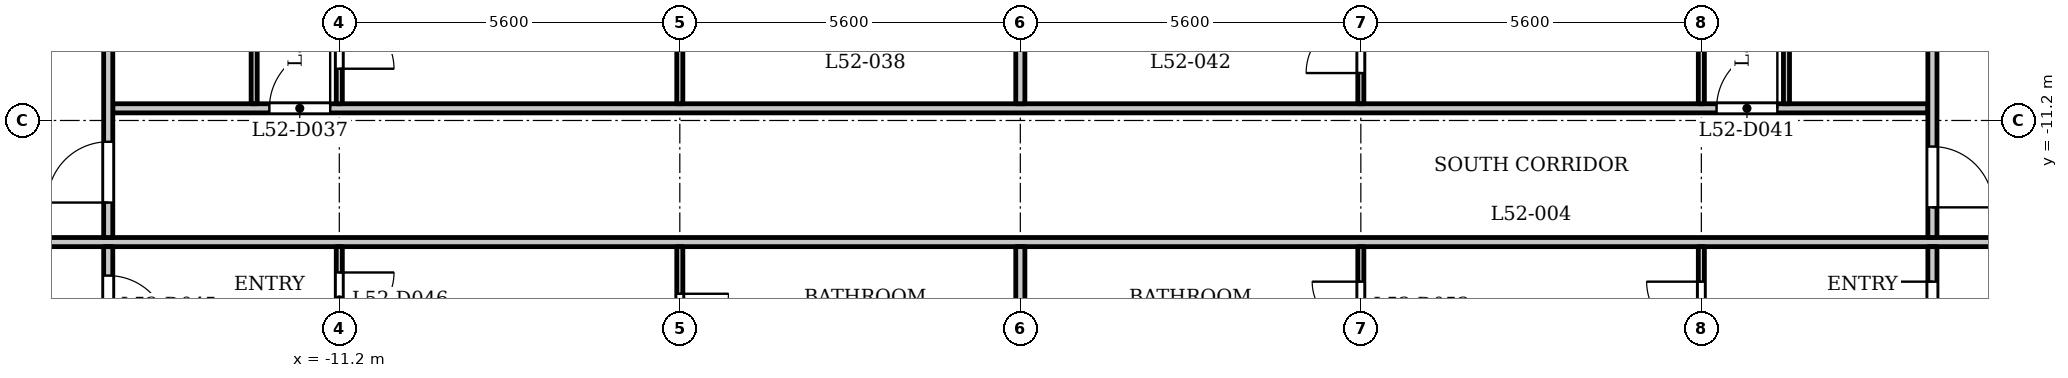
"""IFC4 building model, lengths in metres.
Left out: names, types, materials, properties, quantities, classifications, styles, units other than length and angle.
Written with IfcOpenShell. Run it as: python <this file> out.ifc"""

import sys

from ifc_helpers import new_model, si_unit, direction, frame, frame_2d, origin, place, context, subcontext, project, spatial, rectangle, extrude, element, fill, save


model = new_model("IFC4")
c1 = context("Model", 3, precision=1e-05, world=origin(), true_north=direction((0.0, 1.0)))
c2 = subcontext(c1, "Body", "Model", "MODEL_VIEW")
j1 = project(units=[si_unit("LENGTHUNIT", "METRE"), si_unit("PLANEANGLEUNIT", "RADIAN")], contexts=[c1])
p1 = place(None, origin())
s1 = spatial("IfcSite", under=j1, at=p1, CompositionType="ELEMENT")
p2 = place(p1, origin())
s2 = spatial("IfcBuilding", under=s1, at=p2, CompositionType="ELEMENT")
p3 = place(p2, frame((0.0, 0.0, 202.9)))
s3 = spatial("IfcBuildingStorey", under=s2, at=p3, CompositionType="ELEMENT", Elevation=202.9)
p4 = place(p3, frame((-17.4, -13.2, 0.0), z_axis=(0.0, 0.0, 1.0), x_axis=(1.0, 0.0, 0.0)))
e1 = element("IfcWall", 1, at=p4, inside=s3, PredefinedType="PARTITIONING", context=c2, shape_type="SweptSolid", body=[
    extrude(rectangle(XDim=34.8, YDim=0.15, at=frame_2d((17.4, 0.0))), origin(), (0.0, 0.0, 1.0), 3.2),
])
p5 = place(p4, frame((0.15, 0.0, 0.0)))
e2 = element("IfcOpeningElement", 2, at=p5, cuts=e1, PredefinedType="OPENING", context=c2, shape_type="SweptSolid", body=[
    extrude(rectangle(XDim=1.0, YDim=2.1, at=frame_2d((0.5, 1.05))), frame((0.0, 0.085, 0.0), z_axis=(0.0, -1.0, 0.0), x_axis=(1.0, 0.0, 0.0)), (0.0, 0.0, 1.0), 0.17),
])
p6 = place(p4, frame((33.55, 0.0, 0.0)))
e3 = element("IfcOpeningElement", 3, at=p6, cuts=e1, PredefinedType="OPENING", context=c2, shape_type="SweptSolid", body=[
    extrude(rectangle(XDim=1.0, YDim=2.1, at=frame_2d((0.5, 1.05))), frame((0.0, 0.085, 0.0), z_axis=(0.0, -1.0, 0.0), x_axis=(1.0, 0.0, 0.0)), (0.0, 0.0, 1.0), 0.17),
])
p7 = place(p3, frame((-14.925, -11.0, 0.0), z_axis=(0.0, 0.0, 1.0), x_axis=(1.0, 0.0, 0.0)))
e4 = element("IfcWall", 4, at=p7, inside=s3, PredefinedType="PARTITIONING", context=c2, shape_type="SweptSolid", body=[
    extrude(rectangle(XDim=29.85, YDim=0.15, at=frame_2d((14.925, 0.0))), origin(), (0.0, 0.0, 1.0), 3.2),
])
p8 = place(p7, frame((2.575, 0.0, 0.0)))
e5 = element("IfcOpeningElement", 5, at=p8, cuts=e4, PredefinedType="OPENING", context=c2, shape_type="SweptSolid", body=[
    extrude(rectangle(XDim=1.0, YDim=2.1, at=frame_2d((0.5, 1.05))), frame((0.0, 0.085, 0.0), z_axis=(0.0, -1.0, 0.0), x_axis=(1.0, 0.0, 0.0)), (0.0, 0.0, 1.0), 0.17),
])
p9 = place(p7, frame((26.375, 0.0, 0.0)))
e6 = element("IfcOpeningElement", 6, at=p9, cuts=e4, PredefinedType="OPENING", context=c2, shape_type="SweptSolid", body=[
    extrude(rectangle(XDim=1.0, YDim=2.1, at=frame_2d((0.5, 1.05))), frame((0.0, 0.085, 0.0), z_axis=(0.0, -1.0, 0.0), x_axis=(1.0, 0.0, 0.0)), (0.0, 0.0, 1.0), 0.17),
])
p10 = place(p3, frame((-15.0, -15.325, 0.0), z_axis=(0.0, 0.0, 1.0), x_axis=(0.0, 1.0, 0.0)))
e7 = element("IfcWall", 7, at=p10, inside=s3, PredefinedType="PARTITIONING", context=c2, shape_type="SweptSolid", body=[
    extrude(rectangle(XDim=2.05, YDim=0.15, at=frame_2d((1.025, 0.0))), origin(), (0.0, 0.0, 1.0), 3.2),
])
p11 = place(p10, frame((0.574, 0.0, 0.0)))
e8 = element("IfcOpeningElement", 8, at=p11, cuts=e7, PredefinedType="OPENING", context=c2, shape_type="SweptSolid", body=[
    extrude(rectangle(XDim=1.0, YDim=2.1, at=frame_2d((0.5, 1.05))), frame((0.0, 0.085, 0.0), z_axis=(0.0, -1.0, 0.0), x_axis=(1.0, 0.0, 0.0)), (0.0, 0.0, 1.0), 0.17),
])
p12 = place(p3, frame((-15.0, -13.125, 0.0), z_axis=(0.0, 0.0, 1.0), x_axis=(0.0, 1.0, 0.0)))
e9 = element("IfcWall", 9, at=p12, inside=s3, PredefinedType="PARTITIONING", context=c2, shape_type="SweptSolid", body=[
    extrude(rectangle(XDim=6.356, YDim=0.15, at=frame_2d((3.178, 0.0))), origin(), (0.0, 0.0, 1.0), 3.2),
])
p13 = place(p12, frame((0.575, 0.0, 0.0)))
e10 = element("IfcOpeningElement", 10, at=p13, cuts=e9, PredefinedType="OPENING", context=c2, shape_type="SweptSolid", body=[
    extrude(rectangle(XDim=1.0, YDim=2.1, at=frame_2d((0.5, 1.05))), frame((0.0, 0.085, 0.0), z_axis=(0.0, -1.0, 0.0), x_axis=(1.0, 0.0, 0.0)), (0.0, 0.0, 1.0), 0.17),
])
p14 = place(p3, frame((-12.6, -10.925, 0.0), z_axis=(0.0, 0.0, 1.0), x_axis=(0.0, 1.0, 0.0)))
e11 = element("IfcWall", 11, at=p14, inside=s3, PredefinedType="PARTITIONING", context=c2, shape_type="SweptSolid", body=[
    extrude(rectangle(XDim=3.605, YDim=0.1, at=frame_2d((1.802, 0.0))), origin(), (0.0, 0.0, 1.0), 3.2),
])
p15 = place(p14, frame((1.105, 0.0, 0.0)))
e12 = element("IfcOpeningElement", 12, at=p15, cuts=e11, PredefinedType="OPENING", context=c2, shape_type="SweptSolid", body=[
    extrude(rectangle(XDim=0.8, YDim=2.1, at=frame_2d((0.4, 1.05))), frame((0.0, 0.06, 0.0), z_axis=(0.0, -1.0, 0.0), x_axis=(1.0, 0.0, 0.0)), (0.0, 0.0, 1.0), 0.12),
])
p16 = place(p3, frame((-11.2, -16.45, 0.0), z_axis=(0.0, 0.0, 1.0), x_axis=(0.0, 1.0, 0.0)))
e13 = element("IfcWall", 13, at=p16, inside=s3, PredefinedType="PARTITIONING", context=c2, shape_type="SweptSolid", body=[
    extrude(rectangle(XDim=3.175, YDim=0.1, at=frame_2d((1.587, 0.0))), origin(), (0.0, 0.0, 1.0), 3.2),
])
p17 = place(p16, frame((1.85, 0.0, 0.0)))
e14 = element("IfcOpeningElement", 14, at=p17, cuts=e13, PredefinedType="OPENING", context=c2, shape_type="SweptSolid", body=[
    extrude(rectangle(XDim=0.9, YDim=2.1, at=frame_2d((0.45, 1.05))), frame((0.0, 0.06, 0.0), z_axis=(0.0, -1.0, 0.0), x_axis=(1.0, 0.0, 0.0)), (0.0, 0.0, 1.0), 0.12),
])
p18 = place(p3, frame((-11.2, -10.925, 0.0), z_axis=(0.0, 0.0, 1.0), x_axis=(0.0, 1.0, 0.0)))
e15 = element("IfcWall", 15, at=p18, inside=s3, PredefinedType="PARTITIONING", context=c2, shape_type="SweptSolid", body=[
    extrude(rectangle(XDim=3.605, YDim=0.1, at=frame_2d((1.802, 0.0))), origin(), (0.0, 0.0, 1.0), 3.2),
])
p19 = place(p18, frame((0.576, 0.0, 0.0)))
e16 = element("IfcOpeningElement", 16, at=p19, cuts=e15, PredefinedType="OPENING", context=c2, shape_type="SweptSolid", body=[
    extrude(rectangle(XDim=0.9, YDim=2.1, at=frame_2d((0.45, 1.05))), frame((0.0, 0.06, 0.0), z_axis=(0.0, -1.0, 0.0), x_axis=(1.0, 0.0, 0.0)), (0.0, 0.0, 1.0), 0.12),
])
p20 = place(p3, frame((-5.6, -16.45, 0.0), z_axis=(0.0, 0.0, 1.0), x_axis=(0.0, 1.0, 0.0)))
e17 = element("IfcWall", 17, at=p20, inside=s3, PredefinedType="PARTITIONING", context=c2, shape_type="SweptSolid", body=[
    extrude(rectangle(XDim=3.175, YDim=0.1, at=frame_2d((1.587, 0.0))), origin(), (0.0, 0.0, 1.0), 3.2),
])
p21 = place(p20, frame((1.6, 0.0, 0.0)))
e18 = element("IfcOpeningElement", 18, at=p21, cuts=e17, PredefinedType="OPENING", context=c2, shape_type="SweptSolid", body=[
    extrude(rectangle(XDim=0.8, YDim=2.1, at=frame_2d((0.4, 1.05))), frame((0.0, 0.06, 0.0), z_axis=(0.0, -1.0, 0.0), x_axis=(1.0, 0.0, 0.0)), (0.0, 0.0, 1.0), 0.12),
])
p22 = place(p3, frame((-5.6, -10.925, 0.0), z_axis=(0.0, 0.0, 1.0), x_axis=(0.0, 1.0, 0.0)))
e19 = element("IfcWall", 19, at=p22, inside=s3, PredefinedType="PARTITIONING", context=c2, shape_type="SweptSolid", body=[
    extrude(rectangle(XDim=3.605, YDim=0.1, at=frame_2d((1.802, 0.0))), origin(), (0.0, 0.0, 1.0), 3.2),
])
p23 = place(p22, frame((1.076, 0.0, 0.0)))
e20 = element("IfcOpeningElement", 20, at=p23, cuts=e19, PredefinedType="OPENING", context=c2, shape_type="SweptSolid", body=[
    extrude(rectangle(XDim=0.9, YDim=2.1, at=frame_2d((0.45, 1.05))), frame((0.0, 0.06, 0.0), z_axis=(0.0, -1.0, 0.0), x_axis=(1.0, 0.0, 0.0)), (0.0, 0.0, 1.0), 0.12),
])
p24 = place(p3, frame((0.0, -16.45, 0.0), z_axis=(0.0, 0.0, 1.0), x_axis=(0.0, 1.0, 0.0)))
e21 = element("IfcWall", 21, at=p24, inside=s3, PredefinedType="PARTITIONING", context=c2, shape_type="SweptSolid", body=[
    extrude(rectangle(XDim=3.175, YDim=0.15, at=frame_2d((1.587, 0.0))), origin(), (0.0, 0.0, 1.0), 3.2),
])
p25 = place(p3, frame((0.0, -10.925, 0.0), z_axis=(0.0, 0.0, 1.0), x_axis=(0.0, 1.0, 0.0)))
e22 = element("IfcWall", 22, at=p25, inside=s3, PredefinedType="PARTITIONING", context=c2, shape_type="SweptSolid", body=[
    extrude(rectangle(XDim=3.605, YDim=0.15, at=frame_2d((1.802, 0.0))), origin(), (0.0, 0.0, 1.0), 3.2),
])
p26 = place(p3, frame((5.6, -16.45, 0.0), z_axis=(0.0, 0.0, 1.0), x_axis=(0.0, 1.0, 0.0)))
e23 = element("IfcWall", 23, at=p26, inside=s3, PredefinedType="PARTITIONING", context=c2, shape_type="SweptSolid", body=[
    extrude(rectangle(XDim=3.175, YDim=0.1, at=frame_2d((1.587, 0.0))), origin(), (0.0, 0.0, 1.0), 3.2),
])
p27 = place(p26, frame((1.799, 0.0, 0.0)))
e24 = element("IfcOpeningElement", 24, at=p27, cuts=e23, PredefinedType="OPENING", context=c2, shape_type="SweptSolid", body=[
    extrude(rectangle(XDim=0.8, YDim=2.1, at=frame_2d((0.4, 1.05))), frame((0.0, 0.06, 0.0), z_axis=(0.0, -1.0, 0.0), x_axis=(1.0, 0.0, 0.0)), (0.0, 0.0, 1.0), 0.12),
])
p28 = place(p3, frame((5.6, -10.925, 0.0), z_axis=(0.0, 0.0, 1.0), x_axis=(0.0, 1.0, 0.0)))
e25 = element("IfcWall", 25, at=p28, inside=s3, PredefinedType="PARTITIONING", context=c2, shape_type="SweptSolid", body=[
    extrude(rectangle(XDim=3.605, YDim=0.1, at=frame_2d((1.802, 0.0))), origin(), (0.0, 0.0, 1.0), 3.2),
])
p29 = place(p28, frame((0.505, 0.0, 0.0)))
e26 = element("IfcOpeningElement", 26, at=p29, cuts=e25, PredefinedType="OPENING", context=c2, shape_type="SweptSolid", body=[
    extrude(rectangle(XDim=0.9, YDim=2.1, at=frame_2d((0.45, 1.05))), frame((0.0, 0.06, 0.0), z_axis=(0.0, -1.0, 0.0), x_axis=(1.0, 0.0, 0.0)), (0.0, 0.0, 1.0), 0.12),
])
p30 = place(p3, frame((11.2, -16.45, 0.0), z_axis=(0.0, 0.0, 1.0), x_axis=(0.0, 1.0, 0.0)))
e27 = element("IfcWall", 27, at=p30, inside=s3, PredefinedType="PARTITIONING", context=c2, shape_type="SweptSolid", body=[
    extrude(rectangle(XDim=3.175, YDim=0.1, at=frame_2d((1.587, 0.0))), origin(), (0.0, 0.0, 1.0), 3.2),
])
p31 = place(p30, frame((1.699, 0.0, 0.0)))
e28 = element("IfcOpeningElement", 28, at=p31, cuts=e27, PredefinedType="OPENING", context=c2, shape_type="SweptSolid", body=[
    extrude(rectangle(XDim=0.9, YDim=2.1, at=frame_2d((0.45, 1.05))), frame((0.0, 0.06, 0.0), z_axis=(0.0, -1.0, 0.0), x_axis=(1.0, 0.0, 0.0)), (0.0, 0.0, 1.0), 0.12),
])
p32 = place(p3, frame((11.2, -10.925, 0.0), z_axis=(0.0, 0.0, 1.0), x_axis=(0.0, 1.0, 0.0)))
e29 = element("IfcWall", 29, at=p32, inside=s3, PredefinedType="PARTITIONING", context=c2, shape_type="SweptSolid", body=[
    extrude(rectangle(XDim=3.605, YDim=0.1, at=frame_2d((1.802, 0.0))), origin(), (0.0, 0.0, 1.0), 3.2),
])
p33 = place(p32, frame((1.005, 0.0, 0.0)))
e30 = element("IfcOpeningElement", 30, at=p33, cuts=e29, PredefinedType="OPENING", context=c2, shape_type="SweptSolid", body=[
    extrude(rectangle(XDim=0.9, YDim=2.1, at=frame_2d((0.45, 1.05))), frame((0.0, 0.06, 0.0), z_axis=(0.0, -1.0, 0.0), x_axis=(1.0, 0.0, 0.0)), (0.0, 0.0, 1.0), 0.12),
])
p34 = place(p3, frame((12.6, -10.925, 0.0), z_axis=(0.0, 0.0, 1.0), x_axis=(0.0, 1.0, 0.0)))
e31 = element("IfcWall", 31, at=p34, inside=s3, PredefinedType="PARTITIONING", context=c2, shape_type="SweptSolid", body=[
    extrude(rectangle(XDim=3.605, YDim=0.1, at=frame_2d((1.802, 0.0))), origin(), (0.0, 0.0, 1.0), 3.2),
])
p35 = place(p34, frame((1.076, 0.0, 0.0)))
e32 = element("IfcOpeningElement", 32, at=p35, cuts=e31, PredefinedType="OPENING", context=c2, shape_type="SweptSolid", body=[
    extrude(rectangle(XDim=0.8, YDim=2.1, at=frame_2d((0.4, 1.05))), frame((0.0, 0.06, 0.0), z_axis=(0.0, -1.0, 0.0), x_axis=(1.0, 0.0, 0.0)), (0.0, 0.0, 1.0), 0.12),
])
p36 = place(p3, frame((15.0, -15.325, 0.0), z_axis=(0.0, 0.0, 1.0), x_axis=(0.0, 1.0, 0.0)))
e33 = element("IfcWall", 33, at=p36, inside=s3, PredefinedType="PARTITIONING", context=c2, shape_type="SweptSolid", body=[
    extrude(rectangle(XDim=2.05, YDim=0.15, at=frame_2d((1.025, 0.0))), origin(), (0.0, 0.0, 1.0), 3.2),
])
p37 = place(p36, frame((0.474, 0.0, 0.0)))
e34 = element("IfcOpeningElement", 34, at=p37, cuts=e33, PredefinedType="OPENING", context=c2, shape_type="SweptSolid", body=[
    extrude(rectangle(XDim=1.0, YDim=2.1, at=frame_2d((0.5, 1.05))), frame((0.0, 0.085, 0.0), z_axis=(0.0, -1.0, 0.0), x_axis=(1.0, 0.0, 0.0)), (0.0, 0.0, 1.0), 0.17),
])
p38 = place(p3, frame((15.0, -13.125, 0.0), z_axis=(0.0, 0.0, 1.0), x_axis=(0.0, 1.0, 0.0)))
e35 = element("IfcWall", 35, at=p38, inside=s3, PredefinedType="PARTITIONING", context=c2, shape_type="SweptSolid", body=[
    extrude(rectangle(XDim=6.356, YDim=0.15, at=frame_2d((3.178, 0.0))), origin(), (0.0, 0.0, 1.0), 3.2),
])
p39 = place(p38, frame((0.496, 0.0, 0.0)))
e36 = element("IfcOpeningElement", 36, at=p39, cuts=e35, PredefinedType="OPENING", context=c2, shape_type="SweptSolid", body=[
    extrude(rectangle(XDim=1.0, YDim=2.1, at=frame_2d((0.5, 1.05))), frame((0.0, 0.085, 0.0), z_axis=(0.0, -1.0, 0.0), x_axis=(1.0, 0.0, 0.0)), (0.0, 0.0, 1.0), 0.17),
])
p40 = place(p13, origin())
e37 = element("IfcDoor", 37, at=p40, inside=s3, OperationType="SINGLE_SWING_RIGHT", PredefinedType="DOOR", context=c2, shape_type="SweptSolid", body=[
    extrude(rectangle(XDim=1.0, YDim=2.1, at=frame_2d((0.5, 1.05))), frame((0.0, 0.025, 0.0), z_axis=(0.0, -1.0, 0.0), x_axis=(1.0, 0.0, 0.0)), (0.0, 0.0, 1.0), 0.05),
])
fill(e10, e37)
p41 = place(p39, origin())
e38 = element("IfcDoor", 38, at=p41, inside=s3, OperationType="SINGLE_SWING_LEFT", PredefinedType="DOOR", context=c2, shape_type="SweptSolid", body=[
    extrude(rectangle(XDim=1.0, YDim=2.1, at=frame_2d((0.5, 1.05))), frame((0.0, 0.025, 0.0), z_axis=(0.0, -1.0, 0.0), x_axis=(1.0, 0.0, 0.0)), (0.0, 0.0, 1.0), 0.05),
])
fill(e36, e38)
p42 = place(p8, origin())
e39 = element("IfcDoor", 39, at=p42, inside=s3, OperationType="SINGLE_SWING_LEFT", PredefinedType="DOOR", context=c2, shape_type="SweptSolid", body=[
    extrude(rectangle(XDim=1.0, YDim=2.1, at=frame_2d((0.5, 1.05))), frame((0.0, 0.025, 0.0), z_axis=(0.0, -1.0, 0.0), x_axis=(1.0, 0.0, 0.0)), (0.0, 0.0, 1.0), 0.05),
])
fill(e5, e39)
p43 = place(p19, origin())
e40 = element("IfcDoor", 40, at=p43, inside=s3, OperationType="SINGLE_SWING_LEFT", PredefinedType="DOOR", context=c2, shape_type="SweptSolid", body=[
    extrude(rectangle(XDim=0.9, YDim=2.1, at=frame_2d((0.45, 1.05))), frame((0.0, 0.025, 0.0), z_axis=(0.0, -1.0, 0.0), x_axis=(1.0, 0.0, 0.0)), (0.0, 0.0, 1.0), 0.05),
])
fill(e16, e40)
p44 = place(p9, origin())
e41 = element("IfcDoor", 41, at=p44, inside=s3, OperationType="SINGLE_SWING_LEFT", PredefinedType="DOOR", context=c2, shape_type="SweptSolid", body=[
    extrude(rectangle(XDim=1.0, YDim=2.1, at=frame_2d((0.5, 1.05))), frame((0.0, 0.025, 0.0), z_axis=(0.0, -1.0, 0.0), x_axis=(1.0, 0.0, 0.0)), (0.0, 0.0, 1.0), 0.05),
])
fill(e6, e41)
p45 = place(p29, origin())
e42 = element("IfcDoor", 42, at=p45, inside=s3, OperationType="SINGLE_SWING_RIGHT", PredefinedType="DOOR", context=c2, shape_type="SweptSolid", body=[
    extrude(rectangle(XDim=0.9, YDim=2.1, at=frame_2d((0.45, 1.05))), frame((0.0, 0.025, 0.0), z_axis=(0.0, -1.0, 0.0), x_axis=(1.0, 0.0, 0.0)), (0.0, 0.0, 1.0), 0.05),
])
fill(e26, e42)
p46 = place(p11, origin())
e43 = element("IfcDoor", 43, at=p46, inside=s3, OperationType="SINGLE_SWING_LEFT", PredefinedType="DOOR", context=c2, shape_type="SweptSolid", body=[
    extrude(rectangle(XDim=1.0, YDim=2.1, at=frame_2d((0.5, 1.05))), frame((0.0, 0.025, 0.0), z_axis=(0.0, -1.0, 0.0), x_axis=(1.0, 0.0, 0.0)), (0.0, 0.0, 1.0), 0.05),
])
fill(e8, e43)
p47 = place(p17, origin())
e44 = element("IfcDoor", 44, at=p47, inside=s3, OperationType="SINGLE_SWING_RIGHT", PredefinedType="DOOR", context=c2, shape_type="SweptSolid", body=[
    extrude(rectangle(XDim=0.9, YDim=2.1, at=frame_2d((0.45, 1.05))), frame((0.0, 0.025, 0.0), z_axis=(0.0, -1.0, 0.0), x_axis=(1.0, 0.0, 0.0)), (0.0, 0.0, 1.0), 0.05),
])
fill(e14, e44)
p48 = place(p21, origin())
e45 = element("IfcDoor", 45, at=p48, inside=s3, OperationType="SINGLE_SWING_RIGHT", PredefinedType="DOOR", context=c2, shape_type="SweptSolid", body=[
    extrude(rectangle(XDim=0.8, YDim=2.1, at=frame_2d((0.4, 1.05))), frame((0.0, 0.025, 0.0), z_axis=(0.0, -1.0, 0.0), x_axis=(1.0, 0.0, 0.0)), (0.0, 0.0, 1.0), 0.05),
])
fill(e18, e45)
p49 = place(p37, origin())
e46 = element("IfcDoor", 46, at=p49, inside=s3, OperationType="SINGLE_SWING_LEFT", PredefinedType="DOOR", context=c2, shape_type="SweptSolid", body=[
    extrude(rectangle(XDim=1.0, YDim=2.1, at=frame_2d((0.5, 1.05))), frame((0.0, 0.025, 0.0), z_axis=(0.0, -1.0, 0.0), x_axis=(1.0, 0.0, 0.0)), (0.0, 0.0, 1.0), 0.05),
])
fill(e34, e46)
p50 = place(p31, origin())
e47 = element("IfcDoor", 47, at=p50, inside=s3, OperationType="SINGLE_SWING_LEFT", PredefinedType="DOOR", context=c2, shape_type="SweptSolid", body=[
    extrude(rectangle(XDim=0.9, YDim=2.1, at=frame_2d((0.45, 1.05))), frame((0.0, 0.025, 0.0), z_axis=(0.0, -1.0, 0.0), x_axis=(1.0, 0.0, 0.0)), (0.0, 0.0, 1.0), 0.05),
])
fill(e28, e47)
p51 = place(p27, origin())
e48 = element("IfcDoor", 48, at=p51, inside=s3, OperationType="SINGLE_SWING_LEFT", PredefinedType="DOOR", context=c2, shape_type="SweptSolid", body=[
    extrude(rectangle(XDim=0.8, YDim=2.1, at=frame_2d((0.4, 1.05))), frame((0.0, 0.025, 0.0), z_axis=(0.0, -1.0, 0.0), x_axis=(1.0, 0.0, 0.0)), (0.0, 0.0, 1.0), 0.05),
])
fill(e24, e48)
save(model, sys.argv[1])
